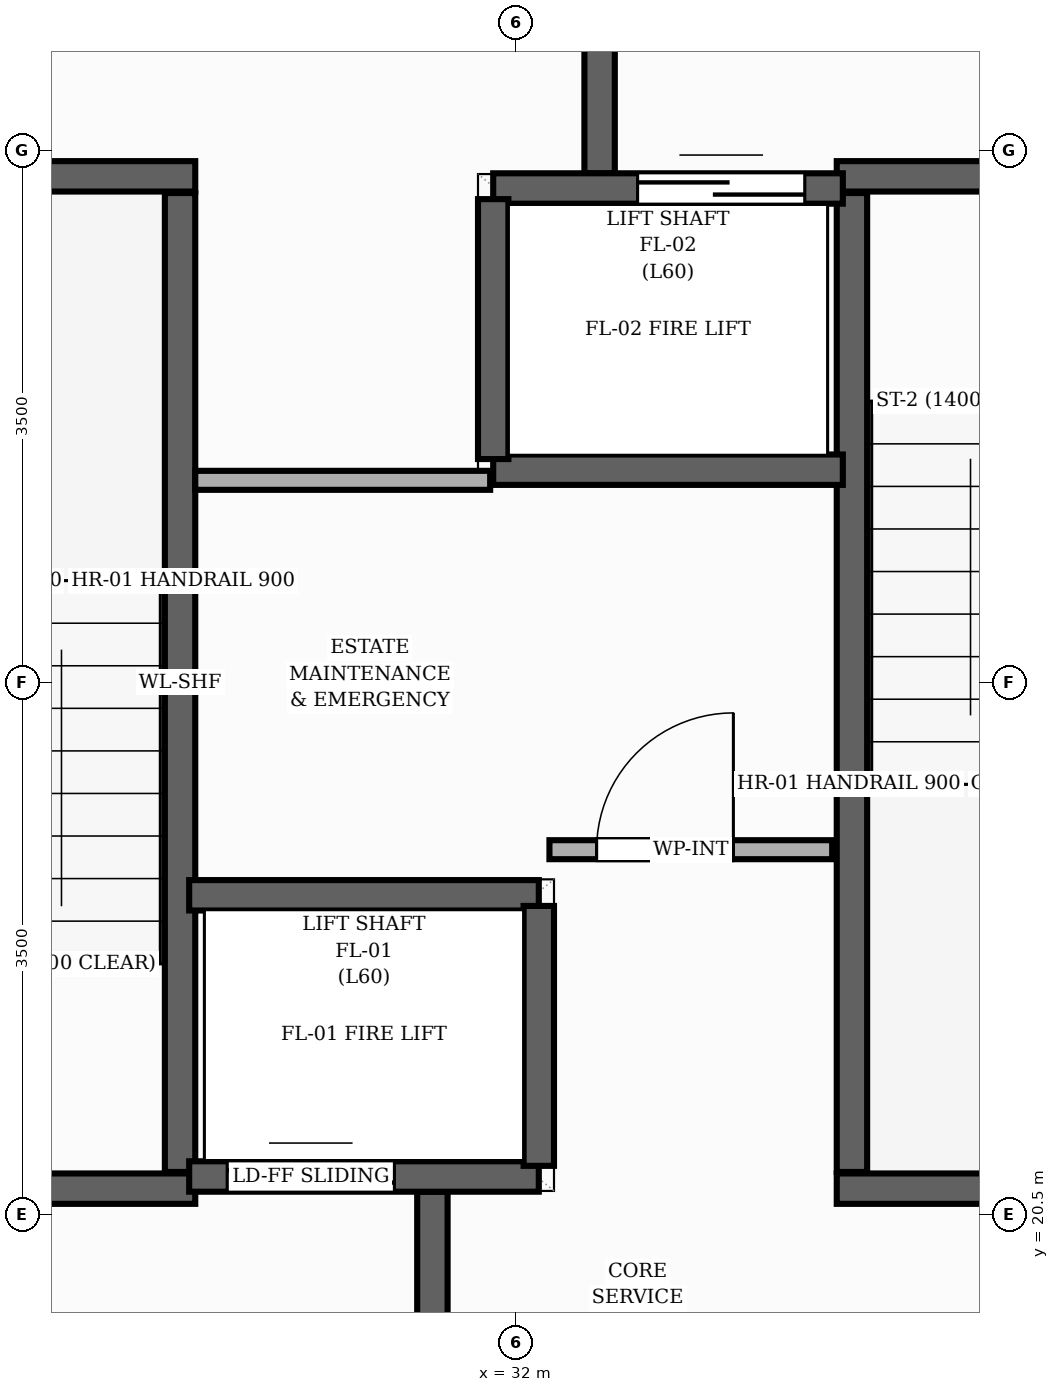
"""IFC4 building model, lengths in metres.
Left out: names, types, materials, properties, quantities, classifications, styles, units other than length and angle.
Written with IfcOpenShell. Run it as: python <this file> out.ifc"""

import sys

from ifc_helpers import new_model, si_unit, direction, frame, frame_2d, origin, place, context, subcontext, project, spatial, rectangle, extrude, element, fill, save


model = new_model("IFC4")
c1 = context("Model", 3, precision=1e-05, world=origin(), true_north=direction((0.0, 1.0)))
c2 = subcontext(c1, "Body", "Model", "MODEL_VIEW")
j1 = project(units=[si_unit("LENGTHUNIT", "METRE"), si_unit("PLANEANGLEUNIT", "RADIAN")], contexts=[c1])
p1 = place(None, origin())
s1 = spatial("IfcSite", under=j1, at=p1, CompositionType="ELEMENT")
p2 = place(p1, origin())
s2 = spatial("IfcBuilding", under=s1, at=p2, CompositionType="ELEMENT")
p3 = place(p2, frame((0.0, 0.0, 201.44)))
s3 = spatial("IfcBuildingStorey", under=s2, at=p3, CompositionType="ELEMENT", Elevation=201.44)
p4 = place(p3, frame((29.79, 20.78, 0.0), z_axis=(0.0, 0.0, 1.0), x_axis=(0.0, 1.0, 0.0)))
e1 = element("IfcWall", 1, at=p4, inside=s3, PredefinedType="SHEAR", context=c2, shape_type="SweptSolid", body=[
    extrude(rectangle(XDim=6.44, YDim=0.2, at=frame_2d((3.22, 0.0))), origin(), (0.0, 0.0, 1.0), 3.2),
])
p5 = place(p3, frame((26.65, 27.33, 0.0), z_axis=(0.0, 0.0, 1.0), x_axis=(1.0, 0.0, 0.0)))
e2 = element("IfcWall", 2, at=p5, inside=s3, PredefinedType="SHEAR", context=c2, shape_type="SweptSolid", body=[
    extrude(rectangle(XDim=3.24, YDim=0.2, at=frame_2d((1.62, 0.0))), origin(), (0.0, 0.0, 1.0), 3.2),
])
p6 = place(p3, frame((26.65, 20.67, 0.0), z_axis=(0.0, 0.0, 1.0), x_axis=(1.0, 0.0, 0.0)))
e3 = element("IfcWall", 3, at=p6, inside=s3, PredefinedType="SHEAR", context=c2, shape_type="SweptSolid", body=[
    extrude(rectangle(XDim=3.24, YDim=0.2, at=frame_2d((1.62, 0.0))), origin(), (0.0, 0.0, 1.0), 3.2),
])
p7 = place(p6, frame((1.055, 0.0, 0.0)))
e4 = element("IfcOpeningElement", 4, at=p7, cuts=e3, PredefinedType="OPENING", context=c2, shape_type="SweptSolid", body=[
    extrude(rectangle(XDim=1.05, YDim=2.15, at=frame_2d((0.525, 1.075))), frame((0.0, 0.11, 0.0), z_axis=(0.0, -1.0, 0.0), x_axis=(1.0, 0.0, 0.0)), (0.0, 0.0, 1.0), 0.22),
])
p8 = place(p3, frame((34.21, 20.78, 0.0), z_axis=(0.0, 0.0, 1.0), x_axis=(0.0, 1.0, 0.0)))
e5 = element("IfcWall", 5, at=p8, inside=s3, PredefinedType="SHEAR", context=c2, shape_type="SweptSolid", body=[
    extrude(rectangle(XDim=6.44, YDim=0.2, at=frame_2d((3.22, 0.0))), origin(), (0.0, 0.0, 1.0), 3.2),
])
p9 = place(p3, frame((34.11, 20.67, 0.0), z_axis=(0.0, 0.0, 1.0), x_axis=(1.0, 0.0, 0.0)))
e6 = element("IfcWall", 6, at=p9, inside=s3, PredefinedType="SHEAR", context=c2, shape_type="SweptSolid", body=[
    extrude(rectangle(XDim=3.24, YDim=0.2, at=frame_2d((1.62, 0.0))), origin(), (0.0, 0.0, 1.0), 3.2),
])
p10 = place(p3, frame((34.11, 27.33, 0.0), z_axis=(0.0, 0.0, 1.0), x_axis=(1.0, 0.0, 0.0)))
e7 = element("IfcWall", 7, at=p10, inside=s3, PredefinedType="SHEAR", context=c2, shape_type="SweptSolid", body=[
    extrude(rectangle(XDim=3.24, YDim=0.2, at=frame_2d((1.62, 0.0))), origin(), (0.0, 0.0, 1.0), 3.2),
])
p11 = place(p10, frame((1.135, 0.0, 0.0)))
e8 = element("IfcOpeningElement", 8, at=p11, cuts=e7, PredefinedType="OPENING", context=c2, shape_type="SweptSolid", body=[
    extrude(rectangle(XDim=1.05, YDim=2.15, at=frame_2d((0.525, 1.075))), frame((0.0, 0.11, 0.0), z_axis=(0.0, -1.0, 0.0), x_axis=(1.0, 0.0, 0.0)), (0.0, 0.0, 1.0), 0.22),
])
for number, where, z_axis, x_axis in (
    (9, (31.45, 17.15, 0.0), (0.0, 0.0, 1.0), (0.0, 1.0, 0.0)),
    (10, (32.55, 27.35, 0.0), (0.0, 0.0, 1.0), (0.0, 1.0, 0.0)),
):
    element("IfcWall", number, at=place(p3, frame(where, z_axis=z_axis, x_axis=x_axis)), inside=s3, PredefinedType="SHEAR", context=c2, shape_type="SweptSolid", body=[
        extrude(rectangle(XDim=3.5, YDim=0.2, at=frame_2d((1.75, 0.0))), origin(), (0.0, 0.0, 1.0), 3.2),
    ])
p12 = place(p3, frame((29.85, 20.75, 0.0), z_axis=(0.0, 0.0, 1.0), x_axis=(1.0, 0.0, 0.0)))
e11 = element("IfcWall", 11, at=p12, inside=s3, PredefinedType="SHEAR", context=c2, shape_type="SweptSolid", body=[
    extrude(rectangle(XDim=2.3, YDim=0.2, at=frame_2d((1.15, 0.0))), origin(), (0.0, 0.0, 1.0), 3.2),
])
p13 = place(p12, frame((0.25, 0.0, 0.0)))
e12 = element("IfcOpeningElement", 12, at=p13, cuts=e11, PredefinedType="OPENING", context=c2, shape_type="SweptSolid", body=[
    extrude(rectangle(XDim=1.1, YDim=2.15, at=frame_2d((0.55, 1.075))), frame((0.0, 0.11, 0.0), z_axis=(0.0, -1.0, 0.0), x_axis=(1.0, 0.0, 0.0)), (0.0, 0.0, 1.0), 0.22),
])
p14 = place(p3, frame((29.85, 22.6, 0.0), z_axis=(0.0, 0.0, 1.0), x_axis=(1.0, 0.0, 0.0)))
e13 = element("IfcWall", 13, at=p14, inside=s3, PredefinedType="SHEAR", context=c2, shape_type="SweptSolid", body=[
    extrude(rectangle(XDim=2.3, YDim=0.2, at=frame_2d((1.15, 0.0))), origin(), (0.0, 0.0, 1.0), 3.2),
])
p15 = place(p3, frame((32.15, 20.82, 0.0), z_axis=(0.0, 0.0, 1.0), x_axis=(0.0, 1.0, 0.0)))
e14 = element("IfcWall", 14, at=p15, inside=s3, PredefinedType="SHEAR", context=c2, shape_type="SweptSolid", body=[
    extrude(rectangle(XDim=1.71, YDim=0.2, at=frame_2d((0.855, 0.0))), origin(), (0.0, 0.0, 1.0), 3.2),
])
p16 = place(p3, frame((31.85, 27.25, 0.0), z_axis=(0.0, 0.0, 1.0), x_axis=(1.0, 0.0, 0.0)))
e15 = element("IfcWall", 15, at=p16, inside=s3, PredefinedType="SHEAR", context=c2, shape_type="SweptSolid", body=[
    extrude(rectangle(XDim=2.3, YDim=0.2, at=frame_2d((1.15, 0.0))), origin(), (0.0, 0.0, 1.0), 3.2),
])
p17 = place(p16, frame((0.95, 0.0, 0.0)))
e16 = element("IfcOpeningElement", 16, at=p17, cuts=e15, PredefinedType="OPENING", context=c2, shape_type="SweptSolid", body=[
    extrude(rectangle(XDim=1.1, YDim=2.15, at=frame_2d((0.55, 1.075))), frame((0.0, 0.11, 0.0), z_axis=(0.0, -1.0, 0.0), x_axis=(1.0, 0.0, 0.0)), (0.0, 0.0, 1.0), 0.22),
])
p18 = place(p3, frame((31.85, 25.4, 0.0), z_axis=(0.0, 0.0, 1.0), x_axis=(1.0, 0.0, 0.0)))
e17 = element("IfcWall", 17, at=p18, inside=s3, PredefinedType="SHEAR", context=c2, shape_type="SweptSolid", body=[
    extrude(rectangle(XDim=2.3, YDim=0.2, at=frame_2d((1.15, 0.0))), origin(), (0.0, 0.0, 1.0), 3.2),
])
p19 = place(p3, frame((31.85, 25.47, 0.0), z_axis=(0.0, 0.0, 1.0), x_axis=(0.0, 1.0, 0.0)))
e18 = element("IfcWall", 18, at=p19, inside=s3, PredefinedType="SHEAR", context=c2, shape_type="SweptSolid", body=[
    extrude(rectangle(XDim=1.71, YDim=0.2, at=frame_2d((0.855, 0.0))), origin(), (0.0, 0.0, 1.0), 3.2),
])
p20 = place(p3, frame((32.22, 22.9, 0.0), z_axis=(0.0, 0.0, 1.0), x_axis=(1.0, 0.0, 0.0)))
e19 = element("IfcWall", 19, at=p20, inside=s3, PredefinedType="PARTITIONING", context=c2, shape_type="SweptSolid", body=[
    extrude(rectangle(XDim=1.86, YDim=0.125, at=frame_2d((0.93, 0.0))), origin(), (0.0, 0.0, 1.0), 2.955),
])
p21 = place(p20, frame((0.31, 0.0, 0.0)))
e20 = element("IfcOpeningElement", 20, at=p21, cuts=e19, PredefinedType="OPENING", context=c2, shape_type="SweptSolid", body=[
    extrude(rectangle(XDim=0.9, YDim=2.1, at=frame_2d((0.45, 1.05))), frame((0.0, 0.073, 0.0), z_axis=(0.0, -1.0, 0.0), x_axis=(1.0, 0.0, 0.0)), (0.0, 0.0, 1.0), 0.145),
])
p22 = place(p3, frame((29.89, 25.33, 0.0), z_axis=(0.0, 0.0, 1.0), x_axis=(1.0, 0.0, 0.0)))
e21 = element("IfcWall", 21, at=p22, inside=s3, PredefinedType="PARTITIONING", context=c2, shape_type="SweptSolid", body=[
    extrude(rectangle(XDim=1.94, YDim=0.125, at=frame_2d((0.97, 0.0))), origin(), (0.0, 0.0, 1.0), 2.955),
])
p23 = place(p13, origin())
e22 = element("IfcDoor", 22, at=p23, inside=s3, OperationType="DOUBLE_DOOR_SLIDING", PredefinedType="DOOR", context=c2, shape_type="SweptSolid", body=[
    extrude(rectangle(XDim=1.1, YDim=2.15, at=frame_2d((0.55, 1.075))), frame((0.0, 0.025, 0.0), z_axis=(0.0, -1.0, 0.0), x_axis=(1.0, 0.0, 0.0)), (0.0, 0.0, 1.0), 0.05),
])
fill(e12, e22)
p24 = place(p17, origin())
e23 = element("IfcDoor", 23, at=p24, inside=s3, OperationType="DOUBLE_DOOR_SLIDING", PredefinedType="DOOR", context=c2, shape_type="SweptSolid", body=[
    extrude(rectangle(XDim=1.1, YDim=2.15, at=frame_2d((0.55, 1.075))), frame((0.0, 0.025, 0.0), z_axis=(0.0, -1.0, 0.0), x_axis=(1.0, 0.0, 0.0)), (0.0, 0.0, 1.0), 0.05),
])
fill(e16, e23)
p25 = place(p21, origin())
e24 = element("IfcDoor", 24, at=p25, inside=s3, OperationType="SINGLE_SWING_RIGHT", PredefinedType="DOOR", context=c2, shape_type="SweptSolid", body=[
    extrude(rectangle(XDim=0.9, YDim=2.1, at=frame_2d((0.45, 1.05))), frame((0.0, 0.025, 0.0), z_axis=(0.0, -1.0, 0.0), x_axis=(1.0, 0.0, 0.0)), (0.0, 0.0, 1.0), 0.05),
])
fill(e20, e24)
save(model, sys.argv[1])
